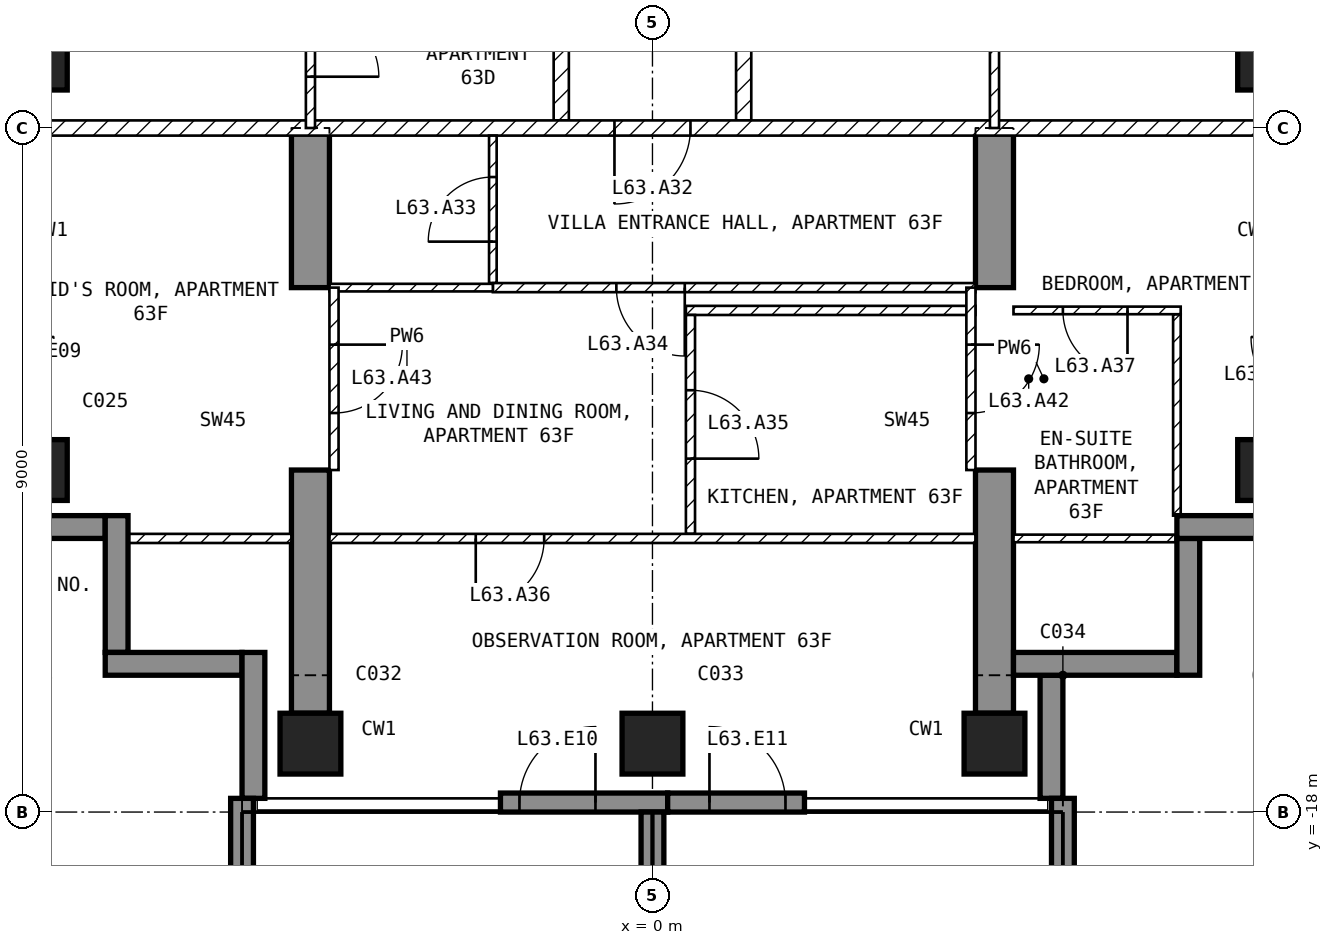
"""IFC4 building model, lengths in metres.
Left out: names, types, materials, properties, quantities, classifications, styles, units other than length and angle.
Written with IfcOpenShell. Run it as: python <this file> out.ifc"""

import sys

from ifc_helpers import new_model, si_unit, direction, frame, frame_2d, origin, origin_2d, place, context, subcontext, project, spatial, polyline, rectangle, outline, extrude, element, fill, save


model = new_model("IFC4")
c1 = context("Model", 3, precision=1e-05, world=origin(), true_north=direction((0.0, 1.0)))
c2 = subcontext(c1, "Body", "Model", "MODEL_VIEW")
j1 = project(units=[si_unit("LENGTHUNIT", "METRE"), si_unit("PLANEANGLEUNIT", "RADIAN")], contexts=[c1])
p1 = place(None, origin())
s1 = spatial("IfcSite", under=j1, at=p1, CompositionType="ELEMENT")
p2 = place(p1, origin())
s2 = spatial("IfcBuilding", under=s1, at=p2, CompositionType="ELEMENT")
p3 = place(p2, frame((0.0, 0.0, 250.0)))
s3 = spatial("IfcBuildingStorey", under=s2, at=p3, CompositionType="ELEMENT", Elevation=250.0)
for number, where, z_axis, x_axis in (
    (1, (-8.1, -13.5, -0.25), (0.0, 0.0, 1.0), (1.0, 0.0, 0.0)),
    (2, (-8.1, -8.1, -0.25), (0.0, 0.0, 1.0), (1.0, 0.0, 0.0)),
    (3, (-4.5, -17.1, -0.25), (0.0, 0.0, 1.0), (1.0, 0.0, 0.0)),
    (4, (0.0, -17.1, -0.25), (0.0, 0.0, 1.0), (1.0, 0.0, 0.0)),
    (5, (4.5, -17.1, -0.25), (0.0, 0.0, 1.0), (1.0, 0.0, 0.0)),
    (6, (8.1, -13.5, -0.25), (0.0, 0.0, 1.0), (1.0, 0.0, 0.0)),
    (7, (8.1, -8.1, -0.25), (0.0, 0.0, 1.0), (1.0, 0.0, 0.0)),
):
    element("IfcColumn", number, at=place(p3, frame(where, z_axis=z_axis, x_axis=x_axis)), inside=s3, PredefinedType="COLUMN", context=c2, shape_type="SweptSolid", body=[
        extrude(rectangle(XDim=0.8, YDim=0.8, at=origin_2d()), origin(), (0.0, 0.0, 1.0), 3.5),
    ])
for number, where, z_axis, x_axis in (
    (8, (-4.75, -16.7, -0.25), (1.0, 0.0, 0.0), (0.0, 1.0, 0.0)),
    (9, (4.25, -16.7, -0.25), (1.0, 0.0, 0.0), (0.0, 1.0, 0.0)),
):
    element("IfcWall", number, at=place(p3, frame(where, z_axis=z_axis, x_axis=x_axis)), inside=s3, PredefinedType="SHEAR", context=c2, shape_type="SweptSolid", body=[
        extrude(outline(polyline([(0.0, 0.0), (3.2, 0.0), (3.2, 2.65), (5.6, 2.65), (5.6, 0.0), (7.7, 0.0), (7.7, 3.5), (0.0, 3.5), (0.0, 0.0)])), origin(), (0.0, 0.0, 1.0), 0.5),
    ])
p4 = place(p3, frame((-2.0, -17.875, 0.0), z_axis=(0.0, 0.0, 1.0), x_axis=(1.0, 0.0, 0.0)))
e10 = element("IfcWall", 10, at=p4, inside=s3, PredefinedType="SOLIDWALL", context=c2, shape_type="SweptSolid", body=[
    extrude(rectangle(XDim=2.2, YDim=0.25, at=frame_2d((1.1, 0.0))), origin(), (0.0, 0.0, 1.0), 3.25),
])
p5 = place(p4, frame((0.25, 0.0, 0.0)))
e11 = element("IfcOpeningElement", 11, at=p5, cuts=e10, PredefinedType="OPENING", context=c2, shape_type="SweptSolid", body=[
    extrude(rectangle(XDim=1.0, YDim=2.4, at=frame_2d((0.5, 1.2))), frame((0.0, 0.135, 0.0), z_axis=(0.0, -1.0, 0.0), x_axis=(1.0, 0.0, 0.0)), (0.0, 0.0, 1.0), 0.27),
])
p6 = place(p3, frame((0.2, -17.875, 0.0), z_axis=(0.0, 0.0, 1.0), x_axis=(1.0, 0.0, 0.0)))
e12 = element("IfcWall", 12, at=p6, inside=s3, PredefinedType="SOLIDWALL", context=c2, shape_type="SweptSolid", body=[
    extrude(rectangle(XDim=1.8, YDim=0.25, at=frame_2d((0.9, 0.0))), origin(), (0.0, 0.0, 1.0), 3.25),
])
p7 = place(p6, frame((0.55, 0.0, 0.0)))
e13 = element("IfcOpeningElement", 13, at=p7, cuts=e12, PredefinedType="OPENING", context=c2, shape_type="SweptSolid", body=[
    extrude(rectangle(XDim=1.0, YDim=2.4, at=frame_2d((0.5, 1.2))), frame((0.0, 0.135, 0.0), z_axis=(0.0, -1.0, 0.0), x_axis=(1.0, 0.0, 0.0)), (0.0, 0.0, 1.0), 0.27),
])
p8 = place(p3, frame((5.25, -17.82, 0.0), z_axis=(0.0, 0.0, 1.0), x_axis=(0.0, 1.0, 0.0)))
e14 = element("IfcWall", 14, at=p8, inside=s3, PredefinedType="SOLIDWALL", context=c2, shape_type="SweptSolid", body=[
    extrude(rectangle(XDim=1.62, YDim=0.3, at=frame_2d((0.81, 0.0))), origin(), (0.0, 0.0, 1.0), 3.25),
])
p9 = place(p3, frame((4.75, -16.05, 0.0), z_axis=(0.0, 0.0, 1.0), x_axis=(1.0, 0.0, 0.0)))
e15 = element("IfcWall", 15, at=p9, inside=s3, PredefinedType="SOLIDWALL", context=c2, shape_type="SweptSolid", body=[
    extrude(rectangle(XDim=2.15, YDim=0.3, at=frame_2d((1.075, 0.0))), origin(), (0.0, 0.0, 1.0), 3.25),
])
p10 = place(p3, frame((7.05, -16.2, 0.0), z_axis=(0.0, 0.0, 1.0), x_axis=(0.0, 1.0, 0.0)))
e16 = element("IfcWall", 16, at=p10, inside=s3, PredefinedType="SOLIDWALL", context=c2, shape_type="SweptSolid", body=[
    extrude(rectangle(XDim=1.8, YDim=0.3, at=frame_2d((0.9, 0.0))), origin(), (0.0, 0.0, 1.0), 3.25),
])
p11 = place(p3, frame((6.9, -14.25, 0.0), z_axis=(0.0, 0.0, 1.0), x_axis=(1.0, 0.0, 0.0)))
e17 = element("IfcWall", 17, at=p11, inside=s3, PredefinedType="SOLIDWALL", context=c2, shape_type="SweptSolid", body=[
    extrude(rectangle(XDim=1.85, YDim=0.3, at=frame_2d((0.925, 0.0))), origin(), (0.0, 0.0, 1.0), 3.25),
])
p12 = place(p3, frame((-8.75, -14.25, 0.0), z_axis=(0.0, 0.0, 1.0), x_axis=(1.0, 0.0, 0.0)))
e18 = element("IfcWall", 18, at=p12, inside=s3, PredefinedType="SOLIDWALL", context=c2, shape_type="SweptSolid", body=[
    extrude(rectangle(XDim=1.55, YDim=0.3, at=frame_2d((0.775, 0.0))), origin(), (0.0, 0.0, 1.0), 3.25),
])
p13 = place(p3, frame((-7.05, -14.1, 0.0), z_axis=(0.0, 0.0, 1.0), x_axis=(0.0, -1.0, 0.0)))
e19 = element("IfcWall", 19, at=p13, inside=s3, PredefinedType="SOLIDWALL", context=c2, shape_type="SweptSolid", body=[
    extrude(rectangle(XDim=1.8, YDim=0.3, at=frame_2d((0.9, 0.0))), origin(), (0.0, 0.0, 1.0), 3.25),
])
p14 = place(p3, frame((-7.2, -16.05, 0.0), z_axis=(0.0, 0.0, 1.0), x_axis=(1.0, 0.0, 0.0)))
e20 = element("IfcWall", 20, at=p14, inside=s3, PredefinedType="SOLIDWALL", context=c2, shape_type="SweptSolid", body=[
    extrude(rectangle(XDim=1.8, YDim=0.3, at=frame_2d((0.9, 0.0))), origin(), (0.0, 0.0, 1.0), 3.25),
])
p15 = place(p3, frame((-5.25, -15.9, 0.0), z_axis=(0.0, 0.0, 1.0), x_axis=(0.0, -1.0, 0.0)))
e21 = element("IfcWall", 21, at=p15, inside=s3, PredefinedType="SOLIDWALL", context=c2, shape_type="SweptSolid", body=[
    extrude(rectangle(XDim=1.92, YDim=0.3, at=frame_2d((0.96, 0.0))), origin(), (0.0, 0.0, 1.0), 3.25),
])
p16 = place(p3, frame((-5.4, -17.82, 0.0), z_axis=(0.0, 0.0, 1.0), x_axis=(0.0, -1.0, 0.0)))
e22 = element("IfcWall", 22, at=p16, inside=s3, PredefinedType="SOLIDWALL", context=c2, shape_type="SweptSolid", body=[
    extrude(rectangle(XDim=2.88, YDim=0.3, at=frame_2d((1.44, 0.0))), origin(), (0.0, 0.0, 1.0), 3.25),
])
p17 = place(p3, frame((0.0, -18.0, 0.0), z_axis=(0.0, 0.0, 1.0), x_axis=(0.0, -1.0, 0.0)))
e23 = element("IfcWall", 23, at=p17, inside=s3, PredefinedType="SOLIDWALL", context=c2, shape_type="SweptSolid", body=[
    extrude(rectangle(XDim=2.7, YDim=0.3, at=frame_2d((1.35, 0.0))), origin(), (0.0, 0.0, 1.0), 3.25),
])
p18 = place(p3, frame((5.4, -17.82, 0.0), z_axis=(0.0, 0.0, 1.0), x_axis=(0.0, -1.0, 0.0)))
e24 = element("IfcWall", 24, at=p18, inside=s3, PredefinedType="SOLIDWALL", context=c2, shape_type="SweptSolid", body=[
    extrude(rectangle(XDim=2.88, YDim=0.3, at=frame_2d((1.44, 0.0))), origin(), (0.0, 0.0, 1.0), 3.25),
])
for number, where, z_axis, x_axis in (
    (25, (1.2, -4.6, 0.0), (0.0, 0.0, 1.0), (0.0, -1.0, 0.0)),
    (26, (-1.2, -8.9, 0.0), (0.0, 0.0, 1.0), (0.0, 1.0, 0.0)),
):
    element("IfcWall", number, at=place(p3, frame(where, z_axis=z_axis, x_axis=x_axis)), inside=s3, PredefinedType="PARTITIONING", context=c2, shape_type="SweptSolid", body=[
        extrude(rectangle(XDim=4.3, YDim=0.2, at=frame_2d((2.15, 0.0))), origin(), (0.0, 0.0, 1.0), 3.25),
    ])
p19 = place(p3, frame((8.92, -9.0, 0.0), z_axis=(0.0, 0.0, 1.0), x_axis=(-1.0, 0.0, 0.0)))
e27 = element("IfcWall", 27, at=p19, inside=s3, PredefinedType="PARTITIONING", context=c2, shape_type="SweptSolid", body=[
    extrude(rectangle(XDim=17.84, YDim=0.2, at=frame_2d((8.92, 0.0))), origin(), (0.0, 0.0, 1.0), 3.25),
])
p20 = place(p19, frame((8.42, 0.0, 0.0)))
e28 = element("IfcOpeningElement", 28, at=p20, cuts=e27, PredefinedType="OPENING", context=c2, shape_type="SweptSolid", body=[
    extrude(rectangle(XDim=1.0, YDim=2.1, at=frame_2d((0.5, 1.05))), frame((0.0, 0.11, 0.0), z_axis=(0.0, -1.0, 0.0), x_axis=(1.0, 0.0, 0.0)), (0.0, 0.0, 1.0), 0.22),
])
p21 = place(p3, frame((4.5, -9.0, 0.0), z_axis=(0.0, 0.0, 1.0), x_axis=(0.0, 1.0, 0.0)))
e29 = element("IfcWall", 29, at=p21, inside=s3, PredefinedType="PARTITIONING", context=c2, shape_type="SweptSolid", body=[
    extrude(rectangle(XDim=4.5, YDim=0.12, at=frame_2d((2.25, 0.0))), origin(), (0.0, 0.0, 1.0), 3.25),
])
p22 = place(p21, frame((1.8, 0.0, 0.0)))
e30 = element("IfcOpeningElement", 30, at=p22, cuts=e29, PredefinedType="OPENING", context=c2, shape_type="SweptSolid", body=[
    extrude(rectangle(XDim=0.9, YDim=2.1, at=frame_2d((0.45, 1.05))), frame((0.0, 0.07, 0.0), z_axis=(0.0, -1.0, 0.0), x_axis=(1.0, 0.0, 0.0)), (0.0, 0.0, 1.0), 0.14),
])
p23 = place(p3, frame((-4.5, -6.75, 0.0), z_axis=(0.0, 0.0, 1.0), x_axis=(0.0, -1.0, 0.0)))
e31 = element("IfcWall", 31, at=p23, inside=s3, PredefinedType="PARTITIONING", context=c2, shape_type="SweptSolid", body=[
    extrude(rectangle(XDim=2.25, YDim=0.12, at=frame_2d((1.125, 0.0))), origin(), (0.0, 0.0, 1.0), 3.25),
])
p24 = place(p23, frame((0.675, 0.0, 0.0)))
e32 = element("IfcOpeningElement", 32, at=p24, cuts=e31, PredefinedType="OPENING", context=c2, shape_type="SweptSolid", body=[
    extrude(rectangle(XDim=0.9, YDim=2.1, at=frame_2d((0.45, 1.05))), frame((0.0, 0.07, 0.0), z_axis=(0.0, -1.0, 0.0), x_axis=(1.0, 0.0, 0.0)), (0.0, 0.0, 1.0), 0.14),
])
p25 = place(p3, frame((-2.1, -11.04, 0.0), z_axis=(0.0, 0.0, 1.0), x_axis=(0.0, 1.0, 0.0)))
e33 = element("IfcWall", 33, at=p25, inside=s3, PredefinedType="PARTITIONING", context=c2, shape_type="SweptSolid", body=[
    extrude(rectangle(XDim=1.94, YDim=0.1, at=frame_2d((0.97, 0.0))), origin(), (0.0, 0.0, 1.0), 3.25),
])
p26 = place(p25, frame((0.545, 0.0, 0.0)))
e34 = element("IfcOpeningElement", 34, at=p26, cuts=e33, PredefinedType="OPENING", context=c2, shape_type="SweptSolid", body=[
    extrude(rectangle(XDim=0.85, YDim=2.1, at=frame_2d((0.425, 1.05))), frame((0.0, 0.06, 0.0), z_axis=(0.0, -1.0, 0.0), x_axis=(1.0, 0.0, 0.0)), (0.0, 0.0, 1.0), 0.12),
])
p27 = place(p3, frame((4.25, -11.1, 0.0), z_axis=(0.0, 0.0, 1.0), x_axis=(-1.0, 0.0, 0.0)))
e35 = element("IfcWall", 35, at=p27, inside=s3, PredefinedType="PARTITIONING", context=c2, shape_type="SweptSolid", body=[
    extrude(rectangle(XDim=6.35, YDim=0.12, at=frame_2d((3.175, 0.0))), origin(), (0.0, 0.0, 1.0), 3.25),
])
p28 = place(p27, frame((3.825, 0.0, 0.0)))
e36 = element("IfcOpeningElement", 36, at=p28, cuts=e35, PredefinedType="OPENING", context=c2, shape_type="SweptSolid", body=[
    extrude(rectangle(XDim=0.9, YDim=2.1, at=frame_2d((0.45, 1.05))), frame((0.0, 0.07, 0.0), z_axis=(0.0, -1.0, 0.0), x_axis=(1.0, 0.0, 0.0)), (0.0, 0.0, 1.0), 0.14),
])
p29 = place(p3, frame((-2.1, -11.1, 0.0), z_axis=(0.0, 0.0, 1.0), x_axis=(-1.0, 0.0, 0.0)))
e37 = element("IfcWall", 37, at=p29, inside=s3, PredefinedType="PARTITIONING", context=c2, shape_type="SweptSolid", body=[
    extrude(rectangle(XDim=2.15, YDim=0.1, at=frame_2d((1.075, 0.0))), origin(), (0.0, 0.0, 1.0), 3.25),
])
p30 = place(p3, frame((4.25, -11.4, 0.0), z_axis=(0.0, 0.0, 1.0), x_axis=(-1.0, 0.0, 0.0)))
e38 = element("IfcWall", 38, at=p30, inside=s3, PredefinedType="PARTITIONING", context=c2, shape_type="SweptSolid", body=[
    extrude(rectangle(XDim=3.81, YDim=0.12, at=frame_2d((1.905, 0.0))), origin(), (0.0, 0.0, 1.0), 3.25),
])
p31 = place(p3, frame((0.5, -11.46, 0.0), z_axis=(0.0, 0.0, 1.0), x_axis=(0.0, -1.0, 0.0)))
e39 = element("IfcWall", 39, at=p31, inside=s3, PredefinedType="PARTITIONING", context=c2, shape_type="SweptSolid", body=[
    extrude(rectangle(XDim=2.88, YDim=0.12, at=frame_2d((1.44, 0.0))), origin(), (0.0, 0.0, 1.0), 3.25),
])
p32 = place(p31, frame((0.99, 0.0, 0.0)))
e40 = element("IfcOpeningElement", 40, at=p32, cuts=e39, PredefinedType="OPENING", context=c2, shape_type="SweptSolid", body=[
    extrude(rectangle(XDim=0.9, YDim=2.1, at=frame_2d((0.45, 1.05))), frame((0.0, 0.07, 0.0), z_axis=(0.0, -1.0, 0.0), x_axis=(1.0, 0.0, 0.0)), (0.0, 0.0, 1.0), 0.14),
])
p33 = place(p3, frame((4.25, -14.4, 0.0), z_axis=(0.0, 0.0, 1.0), x_axis=(-1.0, 0.0, 0.0)))
e41 = element("IfcWall", 41, at=p33, inside=s3, PredefinedType="PARTITIONING", context=c2, shape_type="SweptSolid", body=[
    extrude(rectangle(XDim=8.5, YDim=0.12, at=frame_2d((4.25, 0.0))), origin(), (0.0, 0.0, 1.0), 3.25),
])
p34 = place(p33, frame((5.675, 0.0, 0.0)))
e42 = element("IfcOpeningElement", 42, at=p34, cuts=e41, PredefinedType="OPENING", context=c2, shape_type="SweptSolid", body=[
    extrude(rectangle(XDim=0.9, YDim=2.1, at=frame_2d((0.45, 1.05))), frame((0.0, 0.07, 0.0), z_axis=(0.0, -1.0, 0.0), x_axis=(1.0, 0.0, 0.0)), (0.0, 0.0, 1.0), 0.14),
])
p35 = place(p3, frame((6.9, -14.1, 0.0), z_axis=(0.0, 0.0, 1.0), x_axis=(0.0, 1.0, 0.0)))
e43 = element("IfcWall", 43, at=p35, inside=s3, PredefinedType="PARTITIONING", context=c2, shape_type="SweptSolid", body=[
    extrude(rectangle(XDim=2.65, YDim=0.1, at=frame_2d((1.325, 0.0))), origin(), (0.0, 0.0, 1.0), 3.25),
])
p36 = place(p3, frame((6.95, -11.4, 0.0), z_axis=(0.0, 0.0, 1.0), x_axis=(-1.0, 0.0, 0.0)))
e44 = element("IfcWall", 44, at=p36, inside=s3, PredefinedType="PARTITIONING", context=c2, shape_type="SweptSolid", body=[
    extrude(rectangle(XDim=2.2, YDim=0.1, at=frame_2d((1.1, 0.0))), origin(), (0.0, 0.0, 1.0), 3.25),
])
p37 = place(p36, frame((0.7, 0.0, 0.0)))
e45 = element("IfcOpeningElement", 45, at=p37, cuts=e44, PredefinedType="OPENING", context=c2, shape_type="SweptSolid", body=[
    extrude(rectangle(XDim=0.85, YDim=2.1, at=frame_2d((0.425, 1.05))), frame((0.0, 0.06, 0.0), z_axis=(0.0, -1.0, 0.0), x_axis=(1.0, 0.0, 0.0)), (0.0, 0.0, 1.0), 0.12),
])
p38 = place(p3, frame((7.12, -14.4, 0.0), z_axis=(0.0, 0.0, 1.0), x_axis=(-1.0, 0.0, 0.0)))
e46 = element("IfcWall", 46, at=p38, inside=s3, PredefinedType="PARTITIONING", context=c2, shape_type="SweptSolid", body=[
    extrude(rectangle(XDim=2.37, YDim=0.1, at=frame_2d((1.185, 0.0))), origin(), (0.0, 0.0, 1.0), 3.25),
])
p39 = place(p3, frame((-4.75, -14.4, 0.0), z_axis=(0.0, 0.0, 1.0), x_axis=(-1.0, 0.0, 0.0)))
e47 = element("IfcWall", 47, at=p39, inside=s3, PredefinedType="PARTITIONING", context=c2, shape_type="SweptSolid", body=[
    extrude(rectangle(XDim=2.37, YDim=0.12, at=frame_2d((1.185, 0.0))), origin(), (0.0, 0.0, 1.0), 3.25),
])
p40 = place(p3, frame((4.19, -11.1, 0.0), z_axis=(0.0, 0.0, 1.0), x_axis=(0.0, -1.0, 0.0)))
e48 = element("IfcWall", 48, at=p40, inside=s3, PredefinedType="PARTITIONING", context=c2, shape_type="SweptSolid", body=[
    extrude(rectangle(XDim=2.4, YDim=0.12, at=frame_2d((1.2, 0.0))), origin(), (0.0, 0.0, 1.0), 2.4),
])
p41 = place(p40, frame((0.75, 0.0, 0.0)))
e49 = element("IfcOpeningElement", 49, at=p41, cuts=e48, PredefinedType="OPENING", context=c2, shape_type="SweptSolid", body=[
    extrude(rectangle(XDim=0.9, YDim=2.1, at=frame_2d((0.45, 1.05))), frame((0.0, 0.07, 0.0), z_axis=(0.0, -1.0, 0.0), x_axis=(1.0, 0.0, 0.0)), (0.0, 0.0, 1.0), 0.14),
])
p42 = place(p3, frame((-4.19, -11.1, 0.0), z_axis=(0.0, 0.0, 1.0), x_axis=(0.0, -1.0, 0.0)))
e50 = element("IfcWall", 50, at=p42, inside=s3, PredefinedType="PARTITIONING", context=c2, shape_type="SweptSolid", body=[
    extrude(rectangle(XDim=2.4, YDim=0.12, at=frame_2d((1.2, 0.0))), origin(), (0.0, 0.0, 1.0), 2.4),
])
p43 = place(p42, frame((0.75, 0.0, 0.0)))
e51 = element("IfcOpeningElement", 51, at=p43, cuts=e50, PredefinedType="OPENING", context=c2, shape_type="SweptSolid", body=[
    extrude(rectangle(XDim=0.9, YDim=2.1, at=frame_2d((0.45, 1.05))), frame((0.0, 0.07, 0.0), z_axis=(0.0, -1.0, 0.0), x_axis=(1.0, 0.0, 0.0)), (0.0, 0.0, 1.0), 0.14),
])
p44 = place(p5, origin())
e52 = element("IfcDoor", 52, at=p44, inside=s3, OperationType="SINGLE_SWING_RIGHT", PredefinedType="DOOR", context=c2, shape_type="SweptSolid", body=[
    extrude(rectangle(XDim=1.0, YDim=2.4, at=frame_2d((0.5, 1.2))), frame((0.0, 0.025, 0.0), z_axis=(0.0, -1.0, 0.0), x_axis=(1.0, 0.0, 0.0)), (0.0, 0.0, 1.0), 0.05),
])
fill(e11, e52)
p45 = place(p7, origin())
e53 = element("IfcDoor", 53, at=p45, inside=s3, OperationType="SINGLE_SWING_LEFT", PredefinedType="DOOR", context=c2, shape_type="SweptSolid", body=[
    extrude(rectangle(XDim=1.0, YDim=2.4, at=frame_2d((0.5, 1.2))), frame((0.0, 0.025, 0.0), z_axis=(0.0, -1.0, 0.0), x_axis=(1.0, 0.0, 0.0)), (0.0, 0.0, 1.0), 0.05),
])
fill(e13, e53)
p46 = place(p24, origin())
e54 = element("IfcDoor", 54, at=p46, inside=s3, OperationType="SINGLE_SWING_RIGHT", PredefinedType="DOOR", context=c2, shape_type="SweptSolid", body=[
    extrude(rectangle(XDim=0.9, YDim=2.1, at=frame_2d((0.45, 1.05))), frame((0.0, 0.025, 0.0), z_axis=(0.0, -1.0, 0.0), x_axis=(1.0, 0.0, 0.0)), (0.0, 0.0, 1.0), 0.05),
])
fill(e32, e54)
p47 = place(p20, origin())
e55 = element("IfcDoor", 55, at=p47, inside=s3, OperationType="SINGLE_SWING_RIGHT", PredefinedType="DOOR", context=c2, shape_type="SweptSolid", body=[
    extrude(rectangle(XDim=1.0, YDim=2.1, at=frame_2d((0.5, 1.05))), frame((0.0, 0.025, 0.0), z_axis=(0.0, -1.0, 0.0), x_axis=(1.0, 0.0, 0.0)), (0.0, 0.0, 1.0), 0.05),
])
fill(e28, e55)
p48 = place(p26, origin())
e56 = element("IfcDoor", 56, at=p48, inside=s3, OperationType="SINGLE_SWING_LEFT", PredefinedType="DOOR", context=c2, shape_type="SweptSolid", body=[
    extrude(rectangle(XDim=0.85, YDim=2.1, at=frame_2d((0.425, 1.05))), frame((0.0, 0.025, 0.0), z_axis=(0.0, -1.0, 0.0), x_axis=(1.0, 0.0, 0.0)), (0.0, 0.0, 1.0), 0.05),
])
fill(e34, e56)
p49 = place(p28, origin())
e57 = element("IfcDoor", 57, at=p49, inside=s3, OperationType="SINGLE_SWING_LEFT", PredefinedType="DOOR", context=c2, shape_type="SweptSolid", body=[
    extrude(rectangle(XDim=0.9, YDim=2.1, at=frame_2d((0.45, 1.05))), frame((0.0, 0.025, 0.0), z_axis=(0.0, -1.0, 0.0), x_axis=(1.0, 0.0, 0.0)), (0.0, 0.0, 1.0), 0.05),
])
fill(e36, e57)
p50 = place(p32, origin())
e58 = element("IfcDoor", 58, at=p50, inside=s3, OperationType="SINGLE_SWING_RIGHT", PredefinedType="DOOR", context=c2, shape_type="SweptSolid", body=[
    extrude(rectangle(XDim=0.9, YDim=2.1, at=frame_2d((0.45, 1.05))), frame((0.0, 0.025, 0.0), z_axis=(0.0, -1.0, 0.0), x_axis=(1.0, 0.0, 0.0)), (0.0, 0.0, 1.0), 0.05),
])
fill(e40, e58)
p51 = place(p34, origin())
e59 = element("IfcDoor", 59, at=p51, inside=s3, OperationType="SINGLE_SWING_RIGHT", PredefinedType="DOOR", context=c2, shape_type="SweptSolid", body=[
    extrude(rectangle(XDim=0.9, YDim=2.1, at=frame_2d((0.45, 1.05))), frame((0.0, 0.025, 0.0), z_axis=(0.0, -1.0, 0.0), x_axis=(1.0, 0.0, 0.0)), (0.0, 0.0, 1.0), 0.05),
])
fill(e42, e59)
p52 = place(p37, origin())
e60 = element("IfcDoor", 60, at=p52, inside=s3, OperationType="SINGLE_SWING_LEFT", PredefinedType="DOOR", context=c2, shape_type="SweptSolid", body=[
    extrude(rectangle(XDim=0.85, YDim=2.1, at=frame_2d((0.425, 1.05))), frame((0.0, 0.025, 0.0), z_axis=(0.0, -1.0, 0.0), x_axis=(1.0, 0.0, 0.0)), (0.0, 0.0, 1.0), 0.05),
])
fill(e45, e60)
p53 = place(p41, origin())
e61 = element("IfcDoor", 61, at=p53, inside=s3, OperationType="SINGLE_SWING_LEFT", PredefinedType="DOOR", context=c2, shape_type="SweptSolid", body=[
    extrude(rectangle(XDim=0.9, YDim=2.1, at=frame_2d((0.45, 1.05))), frame((0.0, 0.025, 0.0), z_axis=(0.0, -1.0, 0.0), x_axis=(1.0, 0.0, 0.0)), (0.0, 0.0, 1.0), 0.05),
])
fill(e49, e61)
p54 = place(p43, origin())
e62 = element("IfcDoor", 62, at=p54, inside=s3, OperationType="SINGLE_SWING_LEFT", PredefinedType="DOOR", context=c2, shape_type="SweptSolid", body=[
    extrude(rectangle(XDim=0.9, YDim=2.1, at=frame_2d((0.45, 1.05))), frame((0.0, 0.025, 0.0), z_axis=(0.0, -1.0, 0.0), x_axis=(1.0, 0.0, 0.0)), (0.0, 0.0, 1.0), 0.05),
])
fill(e51, e62)
save(model, sys.argv[1])
